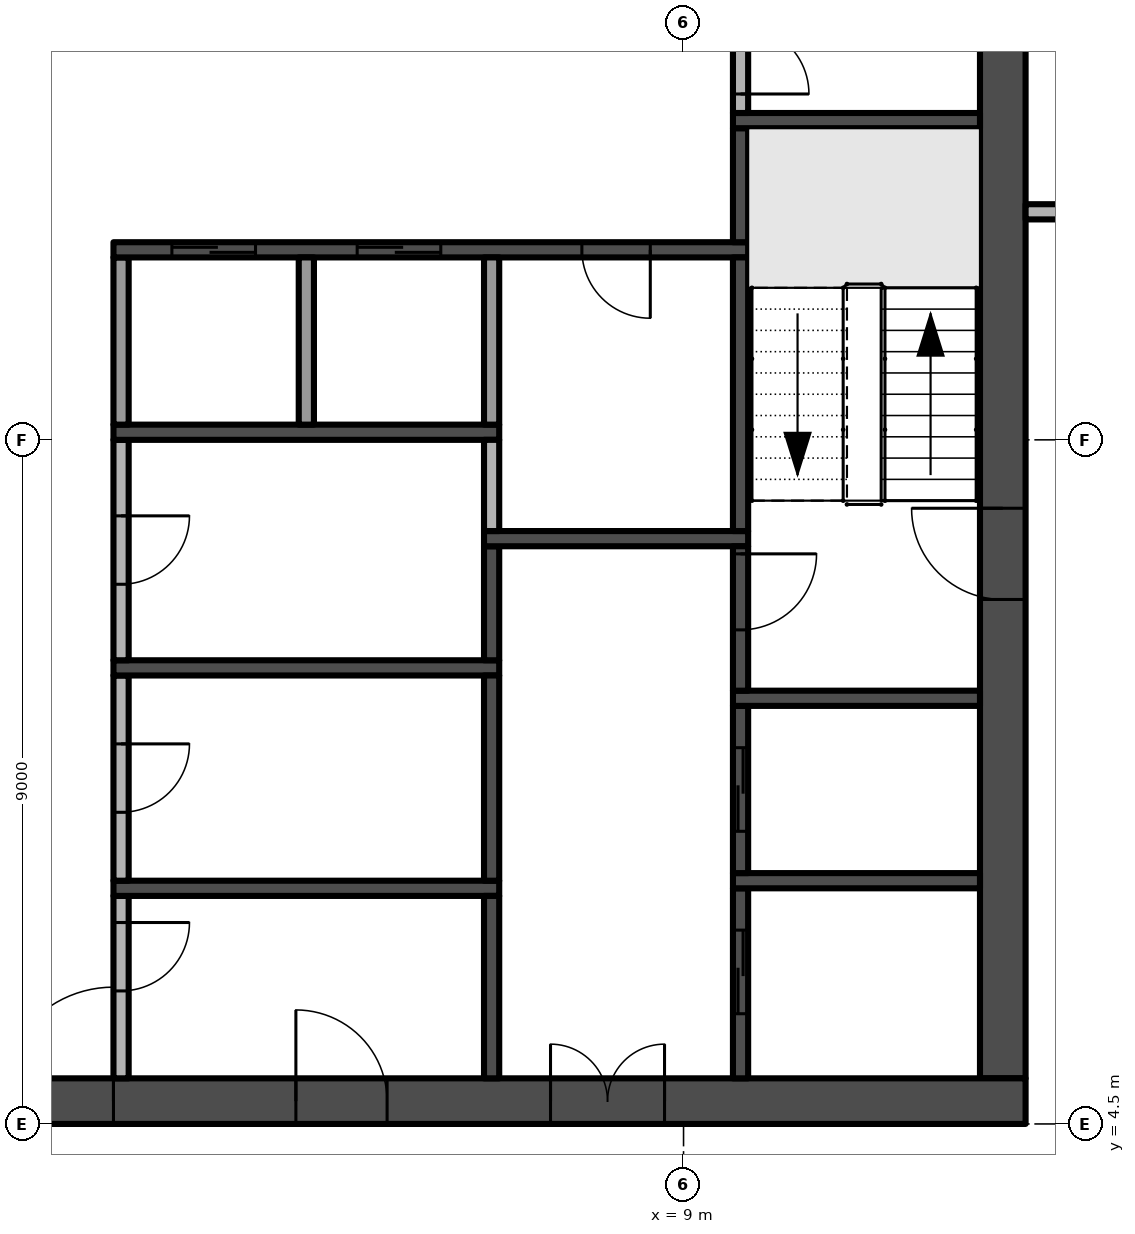
"""IFC4 building model, lengths in metres.
Left out: names, types, materials, properties, quantities, classifications, styles, units other than length and angle.
Written with IfcOpenShell. Run it as: python <this file> out.ifc"""

import sys

from ifc_helpers import new_model, si_unit, direction, frame, frame_2d, origin, place, context, subcontext, project, spatial, rectangle, extrude, element, fill, save


model = new_model("IFC4")
c1 = context("Model", 3, precision=1e-05, world=origin(), true_north=direction((0.0, 1.0)))
c2 = subcontext(c1, "Body", "Model", "MODEL_VIEW")
j1 = project(units=[si_unit("LENGTHUNIT", "METRE"), si_unit("PLANEANGLEUNIT", "RADIAN")], contexts=[c1])
p1 = place(None, origin())
s1 = spatial("IfcSite", under=j1, at=p1, CompositionType="ELEMENT")
p2 = place(p1, origin())
s2 = spatial("IfcBuilding", under=s1, at=p2, CompositionType="ELEMENT")
p3 = place(p2, frame((0.0, 0.0, 238.8)))
s3 = spatial("IfcBuildingStorey", under=s2, at=p3, CompositionType="ELEMENT", Elevation=238.8)
p4 = place(p3, frame((-13.5, 4.8, -0.3), z_axis=(0.0, 0.0, 1.0), x_axis=(1.0, 0.0, 0.0)))
e1 = element("IfcWall", 1, at=p4, inside=s3, PredefinedType="SHEAR", context=c2, shape_type="SweptSolid", body=[
    extrude(rectangle(XDim=27.0, YDim=0.6, at=frame_2d((13.5, 0.0))), origin(), (0.0, 0.0, 1.0), 3.8),
])
p5 = place(p4, frame((12.0, 0.0, 0.3)))
e2 = element("IfcOpeningElement", 2, at=p5, cuts=e1, PredefinedType="OPENING", context=c2, shape_type="SweptSolid", body=[
    extrude(rectangle(XDim=3.0, YDim=2.4, at=frame_2d((1.5, 1.2))), frame((0.0, 0.31, 0.0), z_axis=(0.0, -1.0, 0.0), x_axis=(1.0, 0.0, 0.0)), (0.0, 0.0, 1.0), 0.62),
])
p6 = place(p4, frame((4.9, 0.0, 0.3)))
e3 = element("IfcOpeningElement", 3, at=p6, cuts=e1, PredefinedType="OPENING", context=c2, shape_type="SweptSolid", body=[
    extrude(rectangle(XDim=1.2, YDim=2.2, at=frame_2d((0.6, 1.1))), frame((0.0, 0.31, 0.0), z_axis=(0.0, -1.0, 0.0), x_axis=(1.0, 0.0, 0.0)), (0.0, 0.0, 1.0), 0.62),
])
p7 = place(p4, frame((20.75, 0.0, 0.3)))
e4 = element("IfcOpeningElement", 4, at=p7, cuts=e1, PredefinedType="OPENING", context=c2, shape_type="SweptSolid", body=[
    extrude(rectangle(XDim=1.5, YDim=2.2, at=frame_2d((0.75, 1.1))), frame((0.0, 0.31, 0.0), z_axis=(0.0, -1.0, 0.0), x_axis=(1.0, 0.0, 0.0)), (0.0, 0.0, 1.0), 0.62),
])
p8 = place(p4, frame((17.4, 0.0, 0.3)))
e5 = element("IfcOpeningElement", 5, at=p8, cuts=e1, PredefinedType="OPENING", context=c2, shape_type="SweptSolid", body=[
    extrude(rectangle(XDim=1.2, YDim=2.2, at=frame_2d((0.6, 1.1))), frame((0.0, 0.31, 0.0), z_axis=(0.0, -1.0, 0.0), x_axis=(1.0, 0.0, 0.0)), (0.0, 0.0, 1.0), 0.62),
])
p9 = place(p3, frame((13.2, 5.1, -0.3), z_axis=(0.0, 0.0, 1.0), x_axis=(0.0, 1.0, 0.0)))
e6 = element("IfcWall", 6, at=p9, inside=s3, PredefinedType="SHEAR", context=c2, shape_type="SweptSolid", body=[
    extrude(rectangle(XDim=16.8, YDim=0.6, at=frame_2d((8.4, 0.0))), origin(), (0.0, 0.0, 1.0), 3.8),
])
p10 = place(p9, frame((6.3, 0.0, 0.3)))
e7 = element("IfcOpeningElement", 7, at=p10, cuts=e6, PredefinedType="OPENING", context=c2, shape_type="SweptSolid", body=[
    extrude(rectangle(XDim=1.2, YDim=2.2, at=frame_2d((0.6, 1.1))), frame((0.0, 0.31, 0.0), z_axis=(0.0, -1.0, 0.0), x_axis=(1.0, 0.0, 0.0)), (0.0, 0.0, 1.0), 0.62),
])
p11 = place(p3, frame((1.6, 7.5, 0.0), z_axis=(0.0, 0.0, 1.0), x_axis=(0.0, -1.0, 0.0)))
e8 = element("IfcWall", 8, at=p11, inside=s3, PredefinedType="PARTITIONING", context=c2, shape_type="SweptSolid", body=[
    extrude(rectangle(XDim=2.4, YDim=0.2, at=frame_2d((1.2, 0.0))), origin(), (0.0, 0.0, 1.0), 3.5),
])
p12 = place(p11, frame((0.35, 0.0, 0.0)))
e9 = element("IfcOpeningElement", 9, at=p12, cuts=e8, PredefinedType="OPENING", context=c2, shape_type="SweptSolid", body=[
    extrude(rectangle(XDim=0.9, YDim=2.1, at=frame_2d((0.45, 1.05))), frame((0.0, 0.11, 0.0), z_axis=(0.0, -1.0, 0.0), x_axis=(1.0, 0.0, 0.0)), (0.0, 0.0, 1.0), 0.22),
])
p13 = place(p3, frame((1.5, 7.6, 0.0), z_axis=(0.0, 0.0, 1.0), x_axis=(1.0, 0.0, 0.0)))
e10 = element("IfcWall", 10, at=p13, inside=s3, PredefinedType="SHEAR", context=c2, shape_type="SweptSolid", body=[
    extrude(rectangle(XDim=5.075, YDim=0.2, at=frame_2d((2.538, 0.0))), origin(), (0.0, 0.0, 1.0), 3.5),
])
p14 = place(p3, frame((1.6, 10.4, 0.0), z_axis=(0.0, 0.0, 1.0), x_axis=(0.0, -1.0, 0.0)))
e11 = element("IfcWall", 11, at=p14, inside=s3, PredefinedType="PARTITIONING", context=c2, shape_type="SweptSolid", body=[
    extrude(rectangle(XDim=2.7, YDim=0.2, at=frame_2d((1.35, 0.0))), origin(), (0.0, 0.0, 1.0), 3.5),
])
p15 = place(p14, frame((0.9, 0.0, 0.0)))
e12 = element("IfcOpeningElement", 12, at=p15, cuts=e11, PredefinedType="OPENING", context=c2, shape_type="SweptSolid", body=[
    extrude(rectangle(XDim=0.9, YDim=2.1, at=frame_2d((0.45, 1.05))), frame((0.0, 0.11, 0.0), z_axis=(0.0, -1.0, 0.0), x_axis=(1.0, 0.0, 0.0)), (0.0, 0.0, 1.0), 0.22),
])
p16 = place(p3, frame((1.5, 10.5, 0.0), z_axis=(0.0, 0.0, 1.0), x_axis=(1.0, 0.0, 0.0)))
e13 = element("IfcWall", 13, at=p16, inside=s3, PredefinedType="SHEAR", context=c2, shape_type="SweptSolid", body=[
    extrude(rectangle(XDim=5.075, YDim=0.2, at=frame_2d((2.538, 0.0))), origin(), (0.0, 0.0, 1.0), 3.5),
])
p17 = place(p3, frame((1.6, 13.5, 0.0), z_axis=(0.0, 0.0, 1.0), x_axis=(0.0, -1.0, 0.0)))
e14 = element("IfcWall", 14, at=p17, inside=s3, PredefinedType="PARTITIONING", context=c2, shape_type="SweptSolid", body=[
    extrude(rectangle(XDim=2.9, YDim=0.2, at=frame_2d((1.45, 0.0))), origin(), (0.0, 0.0, 1.0), 3.5),
])
p18 = place(p17, frame((1.0, 0.0, 0.0)))
e15 = element("IfcOpeningElement", 15, at=p18, cuts=e14, PredefinedType="OPENING", context=c2, shape_type="SweptSolid", body=[
    extrude(rectangle(XDim=0.9, YDim=2.1, at=frame_2d((0.45, 1.05))), frame((0.0, 0.11, 0.0), z_axis=(0.0, -1.0, 0.0), x_axis=(1.0, 0.0, 0.0)), (0.0, 0.0, 1.0), 0.22),
])
p19 = place(p3, frame((1.5, 13.6, 0.0), z_axis=(0.0, 0.0, 1.0), x_axis=(1.0, 0.0, 0.0)))
e16 = element("IfcWall", 16, at=p19, inside=s3, PredefinedType="SHEAR", context=c2, shape_type="SweptSolid", body=[
    extrude(rectangle(XDim=5.075, YDim=0.2, at=frame_2d((2.538, 0.0))), origin(), (0.0, 0.0, 1.0), 3.5),
])
p20 = place(p3, frame((1.6, 13.7, 0.0), z_axis=(0.0, 0.0, 1.0), x_axis=(0.0, 1.0, 0.0)))
e17 = element("IfcWall", 17, at=p20, inside=s3, PredefinedType="PARTITIONING", context=c2, shape_type="SweptSolid", body=[
    extrude(rectangle(XDim=2.2, YDim=0.2, at=frame_2d((1.1, 0.0))), origin(), (0.0, 0.0, 1.0), 3.5),
])
p21 = place(p3, frame((9.85, 16.0, 0.0), z_axis=(0.0, 0.0, 1.0), x_axis=(-1.0, 0.0, 0.0)))
e18 = element("IfcWall", 18, at=p21, inside=s3, PredefinedType="SHEAR", context=c2, shape_type="SweptSolid", body=[
    extrude(rectangle(XDim=8.35, YDim=0.2, at=frame_2d((4.175, 0.0))), origin(), (0.0, 0.0, 1.0), 3.5),
])
p22 = place(p21, frame((6.481, 0.0, 0.0)))
e19 = element("IfcOpeningElement", 19, at=p22, cuts=e18, PredefinedType="OPENING", context=c2, shape_type="SweptSolid", body=[
    extrude(rectangle(XDim=1.1, YDim=2.1, at=frame_2d((0.55, 1.05))), frame((0.0, 0.11, 0.0), z_axis=(0.0, -1.0, 0.0), x_axis=(1.0, 0.0, 0.0)), (0.0, 0.0, 1.0), 0.22),
])
p23 = place(p21, frame((4.044, 0.0, 0.0)))
e20 = element("IfcOpeningElement", 20, at=p23, cuts=e18, PredefinedType="OPENING", context=c2, shape_type="SweptSolid", body=[
    extrude(rectangle(XDim=1.1, YDim=2.1, at=frame_2d((0.55, 1.05))), frame((0.0, 0.11, 0.0), z_axis=(0.0, -1.0, 0.0), x_axis=(1.0, 0.0, 0.0)), (0.0, 0.0, 1.0), 0.22),
])
p24 = place(p21, frame((1.288, 0.0, 0.0)))
e21 = element("IfcOpeningElement", 21, at=p24, cuts=e18, PredefinedType="OPENING", context=c2, shape_type="SweptSolid", body=[
    extrude(rectangle(XDim=0.9, YDim=2.1, at=frame_2d((0.45, 1.05))), frame((0.0, 0.11, 0.0), z_axis=(0.0, -1.0, 0.0), x_axis=(1.0, 0.0, 0.0)), (0.0, 0.0, 1.0), 0.22),
])
p25 = place(p3, frame((4.037, 13.7, 0.0), z_axis=(0.0, 0.0, 1.0), x_axis=(0.0, 1.0, 0.0)))
e22 = element("IfcWall", 22, at=p25, inside=s3, PredefinedType="PARTITIONING", context=c2, shape_type="SweptSolid", body=[
    extrude(rectangle(XDim=2.2, YDim=0.2, at=frame_2d((1.1, 0.0))), origin(), (0.0, 0.0, 1.0), 3.5),
])
p26 = place(p3, frame((6.475, 5.1, 0.0), z_axis=(0.0, 0.0, 1.0), x_axis=(0.0, 1.0, 0.0)))
e23 = element("IfcWall", 23, at=p26, inside=s3, PredefinedType="SHEAR", context=c2, shape_type="SweptSolid", body=[
    extrude(rectangle(XDim=2.4, YDim=0.2, at=frame_2d((1.2, 0.0))), origin(), (0.0, 0.0, 1.0), 3.5),
])
p27 = place(p3, frame((6.475, 7.7, 0.0), z_axis=(0.0, 0.0, 1.0), x_axis=(0.0, 1.0, 0.0)))
e24 = element("IfcWall", 24, at=p27, inside=s3, PredefinedType="SHEAR", context=c2, shape_type="SweptSolid", body=[
    extrude(rectangle(XDim=2.7, YDim=0.2, at=frame_2d((1.35, 0.0))), origin(), (0.0, 0.0, 1.0), 3.5),
])
p28 = place(p3, frame((6.475, 10.6, 0.0), z_axis=(0.0, 0.0, 1.0), x_axis=(0.0, 1.0, 0.0)))
e25 = element("IfcWall", 25, at=p28, inside=s3, PredefinedType="SHEAR", context=c2, shape_type="SweptSolid", body=[
    extrude(rectangle(XDim=1.5, YDim=0.2, at=frame_2d((0.75, 0.0))), origin(), (0.0, 0.0, 1.0), 3.5),
])
p29 = place(p3, frame((6.375, 12.2, 0.0), z_axis=(0.0, 0.0, 1.0), x_axis=(1.0, 0.0, 0.0)))
e26 = element("IfcWall", 26, at=p29, inside=s3, PredefinedType="SHEAR", context=c2, shape_type="SweptSolid", body=[
    extrude(rectangle(XDim=3.475, YDim=0.2, at=frame_2d((1.738, 0.0))), origin(), (0.0, 0.0, 1.0), 3.5),
])
p30 = place(p3, frame((6.475, 12.3, 0.0), z_axis=(0.0, 0.0, 1.0), x_axis=(0.0, 1.0, 0.0)))
e27 = element("IfcWall", 27, at=p30, inside=s3, PredefinedType="PARTITIONING", context=c2, shape_type="SweptSolid", body=[
    extrude(rectangle(XDim=1.2, YDim=0.2, at=frame_2d((0.6, 0.0))), origin(), (0.0, 0.0, 1.0), 3.5),
])
p31 = place(p3, frame((6.475, 13.7, 0.0), z_axis=(0.0, 0.0, 1.0), x_axis=(0.0, 1.0, 0.0)))
e28 = element("IfcWall", 28, at=p31, inside=s3, PredefinedType="PARTITIONING", context=c2, shape_type="SweptSolid", body=[
    extrude(rectangle(XDim=2.2, YDim=0.2, at=frame_2d((1.1, 0.0))), origin(), (0.0, 0.0, 1.0), 3.5),
])
p32 = place(p3, frame((9.75, 5.1, 0.0), z_axis=(0.0, 0.0, 1.0), x_axis=(0.0, 1.0, 0.0)))
e29 = element("IfcWall", 29, at=p32, inside=s3, PredefinedType="SHEAR", context=c2, shape_type="SweptSolid", body=[
    extrude(rectangle(XDim=2.5, YDim=0.2, at=frame_2d((1.25, 0.0))), origin(), (0.0, 0.0, 1.0), 3.5),
])
p33 = place(p32, frame((0.85, 0.0, 0.0)))
e30 = element("IfcOpeningElement", 30, at=p33, cuts=e29, PredefinedType="OPENING", context=c2, shape_type="SweptSolid", body=[
    extrude(rectangle(XDim=1.1, YDim=2.1, at=frame_2d((0.55, 1.05))), frame((0.0, 0.11, 0.0), z_axis=(0.0, -1.0, 0.0), x_axis=(1.0, 0.0, 0.0)), (0.0, 0.0, 1.0), 0.22),
])
p34 = place(p3, frame((9.65, 7.7, 0.0), z_axis=(0.0, 0.0, 1.0), x_axis=(1.0, 0.0, 0.0)))
e31 = element("IfcWall", 31, at=p34, inside=s3, PredefinedType="SHEAR", context=c2, shape_type="SweptSolid", body=[
    extrude(rectangle(XDim=3.25, YDim=0.2, at=frame_2d((1.625, 0.0))), origin(), (0.0, 0.0, 1.0), 3.5),
])
p35 = place(p3, frame((9.75, 7.8, 0.0), z_axis=(0.0, 0.0, 1.0), x_axis=(0.0, 1.0, 0.0)))
e32 = element("IfcWall", 32, at=p35, inside=s3, PredefinedType="SHEAR", context=c2, shape_type="SweptSolid", body=[
    extrude(rectangle(XDim=2.2, YDim=0.2, at=frame_2d((1.1, 0.0))), origin(), (0.0, 0.0, 1.0), 3.5),
])
p36 = place(p35, frame((0.55, 0.0, 0.0)))
e33 = element("IfcOpeningElement", 33, at=p36, cuts=e32, PredefinedType="OPENING", context=c2, shape_type="SweptSolid", body=[
    extrude(rectangle(XDim=1.1, YDim=2.1, at=frame_2d((0.55, 1.05))), frame((0.0, 0.11, 0.0), z_axis=(0.0, -1.0, 0.0), x_axis=(1.0, 0.0, 0.0)), (0.0, 0.0, 1.0), 0.22),
])
p37 = place(p3, frame((9.65, 10.1, 0.0), z_axis=(0.0, 0.0, 1.0), x_axis=(1.0, 0.0, 0.0)))
e34 = element("IfcWall", 34, at=p37, inside=s3, PredefinedType="SHEAR", context=c2, shape_type="SweptSolid", body=[
    extrude(rectangle(XDim=3.25, YDim=0.2, at=frame_2d((1.625, 0.0))), origin(), (0.0, 0.0, 1.0), 3.5),
])
p38 = place(p3, frame((9.75, 12.1, 0.0), z_axis=(0.0, 0.0, 1.0), x_axis=(0.0, -1.0, 0.0)))
e35 = element("IfcWall", 35, at=p38, inside=s3, PredefinedType="SHEAR", context=c2, shape_type="SweptSolid", body=[
    extrude(rectangle(XDim=1.9, YDim=0.2, at=frame_2d((0.95, 0.0))), origin(), (0.0, 0.0, 1.0), 3.5),
])
p39 = place(p38, frame((0.1, 0.0, 0.0)))
e36 = element("IfcOpeningElement", 36, at=p39, cuts=e35, PredefinedType="OPENING", context=c2, shape_type="SweptSolid", body=[
    extrude(rectangle(XDim=1.0, YDim=2.2, at=frame_2d((0.5, 1.1))), frame((0.0, 0.11, 0.0), z_axis=(0.0, -1.0, 0.0), x_axis=(1.0, 0.0, 0.0)), (0.0, 0.0, 1.0), 0.22),
])
p40 = place(p3, frame((9.75, 12.3, 0.0), z_axis=(0.0, 0.0, 1.0), x_axis=(0.0, 1.0, 0.0)))
e37 = element("IfcWall", 37, at=p40, inside=s3, PredefinedType="SHEAR", context=c2, shape_type="SweptSolid", body=[
    extrude(rectangle(XDim=3.6, YDim=0.2, at=frame_2d((1.8, 0.0))), origin(), (0.0, 0.0, 1.0), 3.5),
])
p41 = place(p3, frame((9.75, 16.1, 0.0), z_axis=(0.0, 0.0, 1.0), x_axis=(0.0, 1.0, 0.0)))
e38 = element("IfcWall", 38, at=p41, inside=s3, PredefinedType="SHEAR", context=c2, shape_type="SweptSolid", body=[
    extrude(rectangle(XDim=1.5, YDim=0.2, at=frame_2d((0.75, 0.0))), origin(), (0.0, 0.0, 1.0), 3.5),
])
p42 = place(p3, frame((9.65, 17.7, 0.0), z_axis=(0.0, 0.0, 1.0), x_axis=(1.0, 0.0, 0.0)))
e39 = element("IfcWall", 39, at=p42, inside=s3, PredefinedType="SHEAR", context=c2, shape_type="SweptSolid", body=[
    extrude(rectangle(XDim=3.25, YDim=0.2, at=frame_2d((1.625, 0.0))), origin(), (0.0, 0.0, 1.0), 3.5),
])
p43 = place(p3, frame((9.75, 19.2, 0.0), z_axis=(0.0, 0.0, 1.0), x_axis=(0.0, -1.0, 0.0)))
e40 = element("IfcWall", 40, at=p43, inside=s3, PredefinedType="PARTITIONING", context=c2, shape_type="SweptSolid", body=[
    extrude(rectangle(XDim=1.4, YDim=0.2, at=frame_2d((0.7, 0.0))), origin(), (0.0, 0.0, 1.0), 3.5),
])
p44 = place(p43, frame((0.25, 0.0, 0.0)))
e41 = element("IfcOpeningElement", 41, at=p44, cuts=e40, PredefinedType="OPENING", context=c2, shape_type="SweptSolid", body=[
    extrude(rectangle(XDim=0.9, YDim=2.1, at=frame_2d((0.45, 1.05))), frame((0.0, 0.11, 0.0), z_axis=(0.0, -1.0, 0.0), x_axis=(1.0, 0.0, 0.0)), (0.0, 0.0, 1.0), 0.22),
])
p45 = place(p3, frame((13.5, 16.5, 0.0), z_axis=(0.0, 0.0, 1.0), x_axis=(1.0, 0.0, 0.0)))
e42 = element("IfcWall", 42, at=p45, inside=s3, PredefinedType="PARTITIONING", context=c2, shape_type="SweptSolid", body=[
    extrude(rectangle(XDim=3.825, YDim=0.2, at=frame_2d((1.913, 0.0))), origin(), (0.0, 0.0, 1.0), 3.5),
])
p46 = place(p45, frame((1.55, 0.0, 0.0)))
e43 = element("IfcOpeningElement", 43, at=p46, cuts=e42, PredefinedType="OPENING", context=c2, shape_type="SweptSolid", body=[
    extrude(rectangle(XDim=0.9, YDim=2.1, at=frame_2d((0.45, 1.05))), frame((0.0, 0.11, 0.0), z_axis=(0.0, -1.0, 0.0), x_axis=(1.0, 0.0, 0.0)), (0.0, 0.0, 1.0), 0.22),
])
p47 = place(p5, frame((3.0, 0.0, 0.0), z_axis=(0.0, 0.0, 1.0), x_axis=(-1.0, 0.0, 0.0)))
e44 = element("IfcDoor", 44, at=p47, inside=s3, OperationType="DOUBLE_DOOR_SINGLE_SWING", PredefinedType="DOOR", context=c2, shape_type="SweptSolid", body=[
    extrude(rectangle(XDim=3.0, YDim=2.4, at=frame_2d((1.5, 1.2))), frame((0.0, 0.025, 0.0), z_axis=(0.0, -1.0, 0.0), x_axis=(1.0, 0.0, 0.0)), (0.0, 0.0, 1.0), 0.05),
])
fill(e2, e44)
p48 = place(p10, frame((1.2, 0.0, 0.0), z_axis=(0.0, 0.0, 1.0), x_axis=(-1.0, 0.0, 0.0)))
e45 = element("IfcDoor", 45, at=p48, inside=s3, OperationType="SINGLE_SWING_LEFT", PredefinedType="DOOR", context=c2, shape_type="SweptSolid", body=[
    extrude(rectangle(XDim=1.2, YDim=2.2, at=frame_2d((0.6, 1.1))), frame((0.0, 0.025, 0.0), z_axis=(0.0, -1.0, 0.0), x_axis=(1.0, 0.0, 0.0)), (0.0, 0.0, 1.0), 0.05),
])
fill(e7, e45)
p49 = place(p7, frame((1.5, 0.0, 0.0), z_axis=(0.0, 0.0, 1.0), x_axis=(-1.0, 0.0, 0.0)))
e46 = element("IfcDoor", 46, at=p49, inside=s3, OperationType="DOUBLE_DOOR_SINGLE_SWING", PredefinedType="DOOR", context=c2, shape_type="SweptSolid", body=[
    extrude(rectangle(XDim=1.5, YDim=2.2, at=frame_2d((0.75, 1.1))), frame((0.0, 0.025, 0.0), z_axis=(0.0, -1.0, 0.0), x_axis=(1.0, 0.0, 0.0)), (0.0, 0.0, 1.0), 0.05),
])
fill(e4, e46)
p50 = place(p8, frame((1.2, 0.0, 0.0), z_axis=(0.0, 0.0, 1.0), x_axis=(-1.0, 0.0, 0.0)))
e47 = element("IfcDoor", 47, at=p50, inside=s3, OperationType="SINGLE_SWING_RIGHT", PredefinedType="DOOR", context=c2, shape_type="SweptSolid", body=[
    extrude(rectangle(XDim=1.2, YDim=2.2, at=frame_2d((0.6, 1.1))), frame((0.0, 0.025, 0.0), z_axis=(0.0, -1.0, 0.0), x_axis=(1.0, 0.0, 0.0)), (0.0, 0.0, 1.0), 0.05),
])
fill(e5, e47)
p51 = place(p39, origin())
e48 = element("IfcDoor", 48, at=p51, inside=s3, OperationType="SINGLE_SWING_LEFT", PredefinedType="DOOR", context=c2, shape_type="SweptSolid", body=[
    extrude(rectangle(XDim=1.0, YDim=2.2, at=frame_2d((0.5, 1.1))), frame((0.0, 0.025, 0.0), z_axis=(0.0, -1.0, 0.0), x_axis=(1.0, 0.0, 0.0)), (0.0, 0.0, 1.0), 0.05),
])
fill(e36, e48)
p52 = place(p22, origin())
e49 = element("IfcDoor", 49, at=p52, inside=s3, OperationType="SLIDING_TO_RIGHT", PredefinedType="DOOR", context=c2, shape_type="SweptSolid", body=[
    extrude(rectangle(XDim=1.1, YDim=2.1, at=frame_2d((0.55, 1.05))), frame((0.0, 0.025, 0.0), z_axis=(0.0, -1.0, 0.0), x_axis=(1.0, 0.0, 0.0)), (0.0, 0.0, 1.0), 0.05),
])
fill(e19, e49)
p53 = place(p23, origin())
e50 = element("IfcDoor", 50, at=p53, inside=s3, OperationType="SLIDING_TO_RIGHT", PredefinedType="DOOR", context=c2, shape_type="SweptSolid", body=[
    extrude(rectangle(XDim=1.1, YDim=2.1, at=frame_2d((0.55, 1.05))), frame((0.0, 0.025, 0.0), z_axis=(0.0, -1.0, 0.0), x_axis=(1.0, 0.0, 0.0)), (0.0, 0.0, 1.0), 0.05),
])
fill(e20, e50)
p54 = place(p33, origin())
e51 = element("IfcDoor", 51, at=p54, inside=s3, OperationType="SLIDING_TO_RIGHT", PredefinedType="DOOR", context=c2, shape_type="SweptSolid", body=[
    extrude(rectangle(XDim=1.1, YDim=2.1, at=frame_2d((0.55, 1.05))), frame((0.0, 0.025, 0.0), z_axis=(0.0, -1.0, 0.0), x_axis=(1.0, 0.0, 0.0)), (0.0, 0.0, 1.0), 0.05),
])
fill(e30, e51)
p55 = place(p36, origin())
e52 = element("IfcDoor", 52, at=p55, inside=s3, OperationType="SLIDING_TO_RIGHT", PredefinedType="DOOR", context=c2, shape_type="SweptSolid", body=[
    extrude(rectangle(XDim=1.1, YDim=2.1, at=frame_2d((0.55, 1.05))), frame((0.0, 0.025, 0.0), z_axis=(0.0, -1.0, 0.0), x_axis=(1.0, 0.0, 0.0)), (0.0, 0.0, 1.0), 0.05),
])
fill(e33, e52)
p56 = place(p12, origin())
e53 = element("IfcDoor", 53, at=p56, inside=s3, OperationType="SINGLE_SWING_LEFT", PredefinedType="DOOR", context=c2, shape_type="SweptSolid", body=[
    extrude(rectangle(XDim=0.9, YDim=2.1, at=frame_2d((0.45, 1.05))), frame((0.0, 0.025, 0.0), z_axis=(0.0, -1.0, 0.0), x_axis=(1.0, 0.0, 0.0)), (0.0, 0.0, 1.0), 0.05),
])
fill(e9, e53)
p57 = place(p15, origin())
e54 = element("IfcDoor", 54, at=p57, inside=s3, OperationType="SINGLE_SWING_LEFT", PredefinedType="DOOR", context=c2, shape_type="SweptSolid", body=[
    extrude(rectangle(XDim=0.9, YDim=2.1, at=frame_2d((0.45, 1.05))), frame((0.0, 0.025, 0.0), z_axis=(0.0, -1.0, 0.0), x_axis=(1.0, 0.0, 0.0)), (0.0, 0.0, 1.0), 0.05),
])
fill(e12, e54)
p58 = place(p18, origin())
e55 = element("IfcDoor", 55, at=p58, inside=s3, OperationType="SINGLE_SWING_LEFT", PredefinedType="DOOR", context=c2, shape_type="SweptSolid", body=[
    extrude(rectangle(XDim=0.9, YDim=2.1, at=frame_2d((0.45, 1.05))), frame((0.0, 0.025, 0.0), z_axis=(0.0, -1.0, 0.0), x_axis=(1.0, 0.0, 0.0)), (0.0, 0.0, 1.0), 0.05),
])
fill(e15, e55)
p59 = place(p24, origin())
e56 = element("IfcDoor", 56, at=p59, inside=s3, OperationType="SINGLE_SWING_LEFT", PredefinedType="DOOR", context=c2, shape_type="SweptSolid", body=[
    extrude(rectangle(XDim=0.9, YDim=2.1, at=frame_2d((0.45, 1.05))), frame((0.0, 0.025, 0.0), z_axis=(0.0, -1.0, 0.0), x_axis=(1.0, 0.0, 0.0)), (0.0, 0.0, 1.0), 0.05),
])
fill(e21, e56)
p60 = place(p44, origin())
e57 = element("IfcDoor", 57, at=p60, inside=s3, OperationType="SINGLE_SWING_RIGHT", PredefinedType="DOOR", context=c2, shape_type="SweptSolid", body=[
    extrude(rectangle(XDim=0.9, YDim=2.1, at=frame_2d((0.45, 1.05))), frame((0.0, 0.025, 0.0), z_axis=(0.0, -1.0, 0.0), x_axis=(1.0, 0.0, 0.0)), (0.0, 0.0, 1.0), 0.05),
])
fill(e41, e57)
save(model, sys.argv[1])
